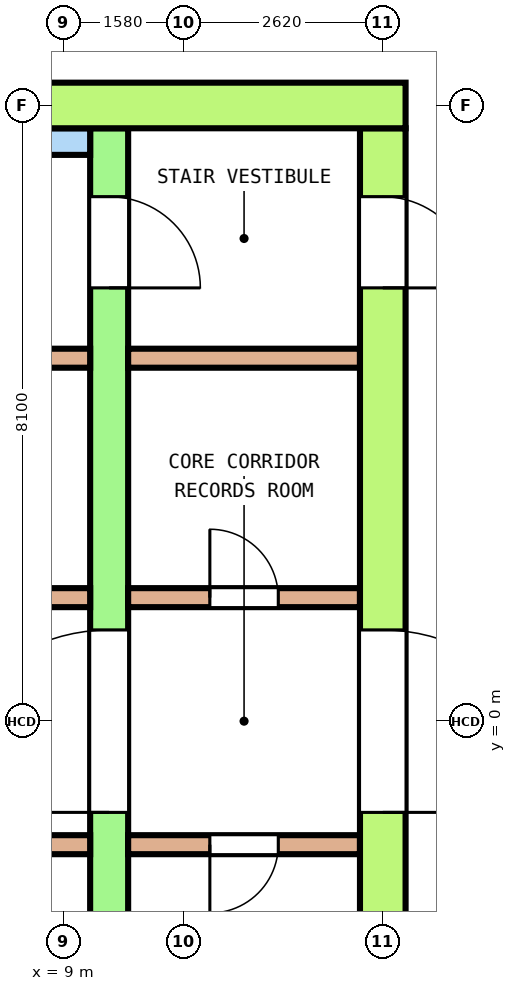
"""IFC4 building model, lengths in metres.
Left out: names, types, materials, properties, quantities, classifications, styles, units other than length and angle.
Written with IfcOpenShell. Run it as: python <this file> out.ifc"""

import sys

from ifc_helpers import new_model, si_unit, direction, frame, frame_2d, origin, place, context, subcontext, project, spatial, polyline, rectangle, outline, extrude, element, fill, save


model = new_model("IFC4")
c1 = context("Model", 3, precision=1e-05, world=origin(), true_north=direction((0.0, 1.0)))
c2 = subcontext(c1, "Body", "Model", "MODEL_VIEW")
j1 = project(units=[si_unit("LENGTHUNIT", "METRE"), si_unit("PLANEANGLEUNIT", "RADIAN")], contexts=[c1])
p1 = place(None, origin())
s1 = spatial("IfcSite", under=j1, at=p1, CompositionType="ELEMENT")
p2 = place(p1, origin())
s2 = spatial("IfcBuilding", under=s1, at=p2, CompositionType="ELEMENT")
p3 = place(p2, frame((0.0, 0.0, 241.4)))
s3 = spatial("IfcBuildingStorey", under=s2, at=p3, CompositionType="ELEMENT", Elevation=241.4)
p4 = place(p3, frame((13.587, -19.266, 0.0), z_axis=(0.0, 0.0, 1.0), x_axis=(0.500004117472, 0.866023026548, 0.0)))
e1 = element("IfcWall", 1, at=p4, inside=s3, PredefinedType="SOLIDWALL", context=c2, shape_type="SweptSolid", body=[
    extrude(outline(polyline([(-0.027, -0.1), (1.017, -0.1), (2.061, -0.1), (3.105, -0.1), (4.149, -0.1), (5.193, -0.1), (6.237, -0.1), (7.281, -0.1), (8.325, -0.1), (9.369, -0.1), (10.414, -0.1), (11.458, -0.1), (12.501, -0.1), (13.546, -0.1), (14.59, -0.1), (15.634, -0.1), (16.678, -0.1), (17.722, -0.1), (18.766, -0.1), (19.81, -0.1), (19.756, 0.1), (18.718, 0.1), (17.679, 0.1), (16.641, 0.1), (15.603, 0.1), (14.564, 0.1), (13.526, 0.1), (12.488, 0.1), (11.449, 0.1), (10.411, 0.1), (9.372, 0.1), (8.334, 0.1), (7.295, 0.1), (6.257, 0.1), (5.219, 0.1), (4.18, 0.1), (3.142, 0.1), (2.104, 0.1), (1.065, 0.1), (0.027, 0.1), (-0.027, -0.1)])), origin(), (0.0, 0.0, 1.0), 3.7),
])
p5 = place(p4, frame((0.528, 0.0, 0.1)))
e2 = element("IfcOpeningElement", 2, at=p5, cuts=e1, PredefinedType="OPENING", context=c2, shape_type="SweptSolid", body=[
    extrude(rectangle(XDim=2.9, YDim=2.65, at=frame_2d((1.45, 1.325))), frame((0.0, 0.11, 0.0), z_axis=(0.0, -1.0, 0.0), x_axis=(1.0, 0.0, 0.0)), (0.0, 0.0, 1.0), 0.22),
])
p6 = place(p4, frame((4.485, 0.0, 0.1)))
e3 = element("IfcOpeningElement", 3, at=p6, cuts=e1, PredefinedType="OPENING", context=c2, shape_type="SweptSolid", body=[
    extrude(rectangle(XDim=2.9, YDim=2.65, at=frame_2d((1.45, 1.325))), frame((0.0, 0.11, 0.0), z_axis=(0.0, -1.0, 0.0), x_axis=(1.0, 0.0, 0.0)), (0.0, 0.0, 1.0), 0.22),
])
p7 = place(p4, frame((8.991, 0.0, 0.0)))
e4 = element("IfcOpeningElement", 4, at=p7, cuts=e1, PredefinedType="OPENING", context=c2, shape_type="SweptSolid", body=[
    extrude(rectangle(XDim=1.8, YDim=2.4, at=frame_2d((0.9, 1.2))), frame((0.0, 0.11, 0.0), z_axis=(0.0, -1.0, 0.0), x_axis=(1.0, 0.0, 0.0)), (0.0, 0.0, 1.0), 0.22),
])
p8 = place(p4, frame((8.991, 0.0, 2.55)))
e5 = element("IfcOpeningElement", 5, at=p8, cuts=e1, PredefinedType="OPENING", context=c2, shape_type="SweptSolid", body=[
    extrude(rectangle(XDim=1.8, YDim=0.2, at=frame_2d((0.9, 0.1))), frame((0.0, 0.11, 0.0), z_axis=(0.0, -1.0, 0.0), x_axis=(1.0, 0.0, 0.0)), (0.0, 0.0, 1.0), 0.22),
])
p9 = place(p4, frame((12.398, 0.0, 0.1)))
e6 = element("IfcOpeningElement", 6, at=p9, cuts=e1, PredefinedType="OPENING", context=c2, shape_type="SweptSolid", body=[
    extrude(rectangle(XDim=2.9, YDim=2.65, at=frame_2d((1.45, 1.325))), frame((0.0, 0.11, 0.0), z_axis=(0.0, -1.0, 0.0), x_axis=(1.0, 0.0, 0.0)), (0.0, 0.0, 1.0), 0.22),
])
p10 = place(p4, frame((16.355, 0.0, 0.1)))
e7 = element("IfcOpeningElement", 7, at=p10, cuts=e1, PredefinedType="OPENING", context=c2, shape_type="SweptSolid", body=[
    extrude(rectangle(XDim=2.9, YDim=2.65, at=frame_2d((1.45, 1.325))), frame((0.0, 0.11, 0.0), z_axis=(0.0, -1.0, 0.0), x_axis=(1.0, 0.0, 0.0)), (0.0, 0.0, 1.0), 0.22),
])
p11 = place(p3, frame((-13.5, 8.1, 0.0), z_axis=(0.0, 0.0, 1.0), x_axis=(1.0, 0.0, 0.0)))
e8 = element("IfcWall", 8, at=p11, inside=s3, PredefinedType="SHEAR", context=c2, shape_type="SweptSolid", body=[
    extrude(rectangle(XDim=27.0, YDim=0.6, at=frame_2d((13.5, 0.0))), origin(), (0.0, 0.0, 1.0), 3.7),
])
p12 = place(p11, frame((14.425, 0.0, 0.0)))
e9 = element("IfcOpeningElement", 9, at=p12, cuts=e8, PredefinedType="OPENING", context=c2, shape_type="SweptSolid", body=[
    extrude(rectangle(XDim=1.4, YDim=2.1, at=frame_2d((0.7, 1.05))), frame((0.0, 0.31, 0.0), z_axis=(0.0, -1.0, 0.0), x_axis=(1.0, 0.0, 0.0)), (0.0, 0.0, 1.0), 0.62),
])
p13 = place(p3, frame((13.2, -7.8, 0.0), z_axis=(0.0, 0.0, 1.0), x_axis=(0.0, 1.0, 0.0)))
e10 = element("IfcWall", 10, at=p13, inside=s3, PredefinedType="SHEAR", context=c2, shape_type="SweptSolid", body=[
    extrude(rectangle(XDim=15.6, YDim=0.6, at=frame_2d((7.8, 0.0))), origin(), (0.0, 0.0, 1.0), 3.7),
])
p14 = place(p13, frame((6.6, 0.0, 0.0)))
e11 = element("IfcOpeningElement", 11, at=p14, cuts=e10, PredefinedType="OPENING", context=c2, shape_type="SweptSolid", body=[
    extrude(rectangle(XDim=2.4, YDim=2.1, at=frame_2d((1.2, 1.05))), frame((0.0, 0.31, 0.0), z_axis=(0.0, -1.0, 0.0), x_axis=(1.0, 0.0, 0.0)), (0.0, 0.0, 1.0), 0.62),
])
p15 = place(p13, frame((13.5, 0.0, 0.0)))
e12 = element("IfcOpeningElement", 12, at=p15, cuts=e10, PredefinedType="OPENING", context=c2, shape_type="SweptSolid", body=[
    extrude(rectangle(XDim=1.2, YDim=2.1, at=frame_2d((0.6, 1.05))), frame((0.0, 0.31, 0.0), z_axis=(0.0, -1.0, 0.0), x_axis=(1.0, 0.0, 0.0)), (0.0, 0.0, 1.0), 0.62),
])
p16 = place(p13, frame((1.0, 0.0, 0.0)))
e13 = element("IfcOpeningElement", 13, at=p16, cuts=e10, PredefinedType="OPENING", context=c2, shape_type="SweptSolid", body=[
    extrude(rectangle(XDim=1.0, YDim=2.1, at=frame_2d((0.5, 1.05))), frame((0.0, 0.31, 0.0), z_axis=(0.0, -1.0, 0.0), x_axis=(1.0, 0.0, 0.0)), (0.0, 0.0, 1.0), 0.62),
])
p17 = place(p3, frame((9.6, -7.8, 0.0), z_axis=(0.0, 0.0, 1.0), x_axis=(0.0, 1.0, 0.0)))
e14 = element("IfcWall", 14, at=p17, inside=s3, PredefinedType="SHEAR", context=c2, shape_type="SweptSolid", body=[
    extrude(rectangle(XDim=15.6, YDim=0.5, at=frame_2d((7.8, 0.0))), origin(), (0.0, 0.0, 1.0), 3.7),
])
p18 = place(p17, frame((6.6, 0.0, 0.0)))
e15 = element("IfcOpeningElement", 15, at=p18, cuts=e14, PredefinedType="OPENING", context=c2, shape_type="SweptSolid", body=[
    extrude(rectangle(XDim=2.4, YDim=2.1, at=frame_2d((1.2, 1.05))), frame((0.0, 0.26, 0.0), z_axis=(0.0, -1.0, 0.0), x_axis=(1.0, 0.0, 0.0)), (0.0, 0.0, 1.0), 0.52),
])
p19 = place(p17, frame((13.5, 0.0, 0.0)))
e16 = element("IfcOpeningElement", 16, at=p19, cuts=e14, PredefinedType="OPENING", context=c2, shape_type="SweptSolid", body=[
    extrude(rectangle(XDim=1.2, YDim=2.1, at=frame_2d((0.6, 1.05))), frame((0.0, 0.26, 0.0), z_axis=(0.0, -1.0, 0.0), x_axis=(1.0, 0.0, 0.0)), (0.0, 0.0, 1.0), 0.52),
])
p20 = place(p17, frame((1.0, 0.0, 0.0)))
e17 = element("IfcOpeningElement", 17, at=p20, cuts=e14, PredefinedType="OPENING", context=c2, shape_type="SweptSolid", body=[
    extrude(rectangle(XDim=1.0, YDim=2.1, at=frame_2d((0.5, 1.05))), frame((0.0, 0.26, 0.0), z_axis=(0.0, -1.0, 0.0), x_axis=(1.0, 0.0, 0.0)), (0.0, 0.0, 1.0), 0.52),
])
p21 = place(p3, frame((-9.35, 1.625, 0.0), z_axis=(0.0, 0.0, 1.0), x_axis=(1.0, 0.0, 0.0)))
e18 = element("IfcWall", 18, at=p21, inside=s3, PredefinedType="SOLIDWALL", context=c2, shape_type="SweptSolid", body=[
    extrude(rectangle(XDim=18.7, YDim=0.25, at=frame_2d((9.35, 0.0))), origin(), (0.0, 0.0, 1.0), 3.7),
])
p22 = place(p21, frame((7.65, 0.0, 0.0)))
e19 = element("IfcOpeningElement", 19, at=p22, cuts=e18, PredefinedType="OPENING", context=c2, shape_type="SweptSolid", body=[
    extrude(rectangle(XDim=1.1, YDim=2.1, at=frame_2d((0.55, 1.05))), frame((0.0, 0.135, 0.0), z_axis=(0.0, -1.0, 0.0), x_axis=(1.0, 0.0, 0.0)), (0.0, 0.0, 1.0), 0.27),
])
p23 = place(p21, frame((9.95, 0.0, 0.0)))
e20 = element("IfcOpeningElement", 20, at=p23, cuts=e18, PredefinedType="OPENING", context=c2, shape_type="SweptSolid", body=[
    extrude(rectangle(XDim=1.1, YDim=2.1, at=frame_2d((0.55, 1.05))), frame((0.0, 0.135, 0.0), z_axis=(0.0, -1.0, 0.0), x_axis=(1.0, 0.0, 0.0)), (0.0, 0.0, 1.0), 0.27),
])
p24 = place(p21, frame((12.4, 0.0, 0.0)))
e21 = element("IfcOpeningElement", 21, at=p24, cuts=e18, PredefinedType="OPENING", context=c2, shape_type="SweptSolid", body=[
    extrude(rectangle(XDim=1.1, YDim=2.1, at=frame_2d((0.55, 1.05))), frame((0.0, 0.135, 0.0), z_axis=(0.0, -1.0, 0.0), x_axis=(1.0, 0.0, 0.0)), (0.0, 0.0, 1.0), 0.27),
])
p25 = place(p21, frame((0.575, 0.0, 0.0)))
e22 = element("IfcOpeningElement", 22, at=p25, cuts=e18, PredefinedType="OPENING", context=c2, shape_type="SweptSolid", body=[
    extrude(rectangle(XDim=0.9, YDim=2.1, at=frame_2d((0.45, 1.05))), frame((0.0, 0.135, 0.0), z_axis=(0.0, -1.0, 0.0), x_axis=(1.0, 0.0, 0.0)), (0.0, 0.0, 1.0), 0.27),
])
p26 = place(p21, frame((2.919, 0.0, 0.0)))
e23 = element("IfcOpeningElement", 23, at=p26, cuts=e18, PredefinedType="OPENING", context=c2, shape_type="SweptSolid", body=[
    extrude(rectangle(XDim=0.9, YDim=2.1, at=frame_2d((0.45, 1.05))), frame((0.0, 0.135, 0.0), z_axis=(0.0, -1.0, 0.0), x_axis=(1.0, 0.0, 0.0)), (0.0, 0.0, 1.0), 0.27),
])
p27 = place(p21, frame((5.281, 0.0, 0.0)))
e24 = element("IfcOpeningElement", 24, at=p27, cuts=e18, PredefinedType="OPENING", context=c2, shape_type="SweptSolid", body=[
    extrude(rectangle(XDim=0.9, YDim=2.1, at=frame_2d((0.45, 1.05))), frame((0.0, 0.135, 0.0), z_axis=(0.0, -1.0, 0.0), x_axis=(1.0, 0.0, 0.0)), (0.0, 0.0, 1.0), 0.27),
])
p28 = place(p21, frame((14.9, 0.0, 0.0)))
e25 = element("IfcOpeningElement", 25, at=p28, cuts=e18, PredefinedType="OPENING", context=c2, shape_type="SweptSolid", body=[
    extrude(rectangle(XDim=0.9, YDim=2.1, at=frame_2d((0.45, 1.05))), frame((0.0, 0.135, 0.0), z_axis=(0.0, -1.0, 0.0), x_axis=(1.0, 0.0, 0.0)), (0.0, 0.0, 1.0), 0.27),
])
p29 = place(p21, frame((17.225, 0.0, 0.0)))
e26 = element("IfcOpeningElement", 26, at=p29, cuts=e18, PredefinedType="OPENING", context=c2, shape_type="SweptSolid", body=[
    extrude(rectangle(XDim=0.9, YDim=2.1, at=frame_2d((0.45, 1.05))), frame((0.0, 0.135, 0.0), z_axis=(0.0, -1.0, 0.0), x_axis=(1.0, 0.0, 0.0)), (0.0, 0.0, 1.0), 0.27),
])
p30 = place(p3, frame((9.85, 1.625, 0.0), z_axis=(0.0, 0.0, 1.0), x_axis=(1.0, 0.0, 0.0)))
e27 = element("IfcWall", 27, at=p30, inside=s3, PredefinedType="SOLIDWALL", context=c2, shape_type="SweptSolid", body=[
    extrude(rectangle(XDim=3.05, YDim=0.25, at=frame_2d((1.525, 0.0))), origin(), (0.0, 0.0, 1.0), 3.7),
])
p31 = place(p30, frame((1.075, 0.0, 0.0)))
e28 = element("IfcOpeningElement", 28, at=p31, cuts=e27, PredefinedType="OPENING", context=c2, shape_type="SweptSolid", body=[
    extrude(rectangle(XDim=0.9, YDim=2.1, at=frame_2d((0.45, 1.05))), frame((0.0, 0.135, 0.0), z_axis=(0.0, -1.0, 0.0), x_axis=(1.0, 0.0, 0.0)), (0.0, 0.0, 1.0), 0.27),
])
p32 = place(p3, frame((-9.35, 4.775, 0.0), z_axis=(0.0, 0.0, 1.0), x_axis=(1.0, 0.0, 0.0)))
e29 = element("IfcWall", 29, at=p32, inside=s3, PredefinedType="SOLIDWALL", context=c2, shape_type="SweptSolid", body=[
    extrude(rectangle(XDim=18.7, YDim=0.25, at=frame_2d((9.35, 0.0))), origin(), (0.0, 0.0, 1.0), 3.7),
])
p33 = place(p3, frame((9.85, 4.775, 0.0), z_axis=(0.0, 0.0, 1.0), x_axis=(1.0, 0.0, 0.0)))
e30 = element("IfcWall", 30, at=p33, inside=s3, PredefinedType="SOLIDWALL", context=c2, shape_type="SweptSolid", body=[
    extrude(rectangle(XDim=3.05, YDim=0.25, at=frame_2d((1.525, 0.0))), origin(), (0.0, 0.0, 1.0), 3.7),
])
p34 = place(p3, frame((-9.35, -1.625, 0.0), z_axis=(0.0, 0.0, 1.0), x_axis=(1.0, 0.0, 0.0)))
e31 = element("IfcWall", 31, at=p34, inside=s3, PredefinedType="SOLIDWALL", context=c2, shape_type="SweptSolid", body=[
    extrude(rectangle(XDim=18.7, YDim=0.25, at=frame_2d((9.35, 0.0))), origin(), (0.0, 0.0, 1.0), 3.7),
])
p35 = place(p34, frame((7.65, 0.0, 0.0)))
e32 = element("IfcOpeningElement", 32, at=p35, cuts=e31, PredefinedType="OPENING", context=c2, shape_type="SweptSolid", body=[
    extrude(rectangle(XDim=1.1, YDim=2.1, at=frame_2d((0.55, 1.05))), frame((0.0, 0.135, 0.0), z_axis=(0.0, -1.0, 0.0), x_axis=(1.0, 0.0, 0.0)), (0.0, 0.0, 1.0), 0.27),
])
p36 = place(p34, frame((9.95, 0.0, 0.0)))
e33 = element("IfcOpeningElement", 33, at=p36, cuts=e31, PredefinedType="OPENING", context=c2, shape_type="SweptSolid", body=[
    extrude(rectangle(XDim=1.1, YDim=2.1, at=frame_2d((0.55, 1.05))), frame((0.0, 0.135, 0.0), z_axis=(0.0, -1.0, 0.0), x_axis=(1.0, 0.0, 0.0)), (0.0, 0.0, 1.0), 0.27),
])
p37 = place(p34, frame((12.4, 0.0, 0.0)))
e34 = element("IfcOpeningElement", 34, at=p37, cuts=e31, PredefinedType="OPENING", context=c2, shape_type="SweptSolid", body=[
    extrude(rectangle(XDim=1.1, YDim=2.1, at=frame_2d((0.55, 1.05))), frame((0.0, 0.135, 0.0), z_axis=(0.0, -1.0, 0.0), x_axis=(1.0, 0.0, 0.0)), (0.0, 0.0, 1.0), 0.27),
])
p38 = place(p34, frame((0.575, 0.0, 0.0)))
e35 = element("IfcOpeningElement", 35, at=p38, cuts=e31, PredefinedType="OPENING", context=c2, shape_type="SweptSolid", body=[
    extrude(rectangle(XDim=0.9, YDim=2.1, at=frame_2d((0.45, 1.05))), frame((0.0, 0.135, 0.0), z_axis=(0.0, -1.0, 0.0), x_axis=(1.0, 0.0, 0.0)), (0.0, 0.0, 1.0), 0.27),
])
p39 = place(p34, frame((2.519, 0.0, 0.0)))
e36 = element("IfcOpeningElement", 36, at=p39, cuts=e31, PredefinedType="OPENING", context=c2, shape_type="SweptSolid", body=[
    extrude(rectangle(XDim=0.9, YDim=2.1, at=frame_2d((0.45, 1.05))), frame((0.0, 0.135, 0.0), z_axis=(0.0, -1.0, 0.0), x_axis=(1.0, 0.0, 0.0)), (0.0, 0.0, 1.0), 0.27),
])
p40 = place(p34, frame((4.881, 0.0, 0.0)))
e37 = element("IfcOpeningElement", 37, at=p40, cuts=e31, PredefinedType="OPENING", context=c2, shape_type="SweptSolid", body=[
    extrude(rectangle(XDim=0.9, YDim=2.1, at=frame_2d((0.45, 1.05))), frame((0.0, 0.135, 0.0), z_axis=(0.0, -1.0, 0.0), x_axis=(1.0, 0.0, 0.0)), (0.0, 0.0, 1.0), 0.27),
])
p41 = place(p34, frame((14.9, 0.0, 0.0)))
e38 = element("IfcOpeningElement", 38, at=p41, cuts=e31, PredefinedType="OPENING", context=c2, shape_type="SweptSolid", body=[
    extrude(rectangle(XDim=0.9, YDim=2.1, at=frame_2d((0.45, 1.05))), frame((0.0, 0.135, 0.0), z_axis=(0.0, -1.0, 0.0), x_axis=(1.0, 0.0, 0.0)), (0.0, 0.0, 1.0), 0.27),
])
p42 = place(p34, frame((17.225, 0.0, 0.0)))
e39 = element("IfcOpeningElement", 39, at=p42, cuts=e31, PredefinedType="OPENING", context=c2, shape_type="SweptSolid", body=[
    extrude(rectangle(XDim=0.9, YDim=2.1, at=frame_2d((0.45, 1.05))), frame((0.0, 0.135, 0.0), z_axis=(0.0, -1.0, 0.0), x_axis=(1.0, 0.0, 0.0)), (0.0, 0.0, 1.0), 0.27),
])
p43 = place(p3, frame((9.85, -1.625, 0.0), z_axis=(0.0, 0.0, 1.0), x_axis=(1.0, 0.0, 0.0)))
e40 = element("IfcWall", 40, at=p43, inside=s3, PredefinedType="SOLIDWALL", context=c2, shape_type="SweptSolid", body=[
    extrude(rectangle(XDim=3.05, YDim=0.25, at=frame_2d((1.525, 0.0))), origin(), (0.0, 0.0, 1.0), 3.7),
])
p44 = place(p43, frame((1.075, 0.0, 0.0)))
e41 = element("IfcOpeningElement", 41, at=p44, cuts=e40, PredefinedType="OPENING", context=c2, shape_type="SweptSolid", body=[
    extrude(rectangle(XDim=0.9, YDim=2.1, at=frame_2d((0.45, 1.05))), frame((0.0, 0.135, 0.0), z_axis=(0.0, -1.0, 0.0), x_axis=(1.0, 0.0, 0.0)), (0.0, 0.0, 1.0), 0.27),
])
p45 = place(p3, frame((3.55, 7.625, 0.0), z_axis=(0.0, 0.0, 1.0), x_axis=(1.0, 0.0, 0.0)))
e42 = element("IfcWall", 42, at=p45, inside=s3, PredefinedType="SOLIDWALL", context=c2, shape_type="SweptSolid", body=[
    extrude(rectangle(XDim=5.8, YDim=0.35, at=frame_2d((2.9, 0.0))), origin(), (0.0, 0.0, 1.0), 3.7),
])
p46 = place(p18, origin())
e43 = element("IfcDoor", 43, at=p46, inside=s3, OperationType="DOUBLE_DOOR_SINGLE_SWING", PredefinedType="DOOR", context=c2, shape_type="SweptSolid", body=[
    extrude(rectangle(XDim=2.4, YDim=2.1, at=frame_2d((1.2, 1.05))), frame((0.0, 0.2, 0.0), z_axis=(0.0, -1.0, 0.0), x_axis=(1.0, 0.0, 0.0)), (0.0, 0.0, 1.0), 0.4),
])
fill(e15, e43)
p47 = place(p14, origin())
e44 = element("IfcDoor", 44, at=p47, inside=s3, OperationType="DOUBLE_DOOR_SINGLE_SWING", PredefinedType="DOOR", context=c2, shape_type="SweptSolid", body=[
    extrude(rectangle(XDim=2.4, YDim=2.1, at=frame_2d((1.2, 1.05))), frame((0.0, 0.25, 0.0), z_axis=(0.0, -1.0, 0.0), x_axis=(1.0, 0.0, 0.0)), (0.0, 0.0, 1.0), 0.5),
])
fill(e11, e44)
p48 = place(p19, origin())
e45 = element("IfcDoor", 45, at=p48, inside=s3, OperationType="SINGLE_SWING_RIGHT", PredefinedType="DOOR", context=c2, shape_type="SweptSolid", body=[
    extrude(rectangle(XDim=1.2, YDim=2.1, at=frame_2d((0.6, 1.05))), frame((0.0, 0.2, 0.0), z_axis=(0.0, -1.0, 0.0), x_axis=(1.0, 0.0, 0.0)), (0.0, 0.0, 1.0), 0.4),
])
fill(e16, e45)
p49 = place(p15, origin())
e46 = element("IfcDoor", 46, at=p49, inside=s3, OperationType="SINGLE_SWING_LEFT", PredefinedType="DOOR", context=c2, shape_type="SweptSolid", body=[
    extrude(rectangle(XDim=1.2, YDim=2.1, at=frame_2d((0.6, 1.05))), frame((0.0, 0.25, 0.0), z_axis=(0.0, -1.0, 0.0), x_axis=(1.0, 0.0, 0.0)), (0.0, 0.0, 1.0), 0.5),
])
fill(e12, e46)
p50 = place(p31, origin())
e47 = element("IfcDoor", 47, at=p50, inside=s3, OperationType="SINGLE_SWING_RIGHT", PredefinedType="DOOR", context=c2, shape_type="SweptSolid", body=[
    extrude(rectangle(XDim=0.9, YDim=2.1, at=frame_2d((0.45, 1.05))), frame((0.0, 0.075, 0.0), z_axis=(0.0, -1.0, 0.0), x_axis=(1.0, 0.0, 0.0)), (0.0, 0.0, 1.0), 0.15),
])
fill(e28, e47)
p51 = place(p44, origin())
e48 = element("IfcDoor", 48, at=p51, inside=s3, OperationType="SINGLE_SWING_LEFT", PredefinedType="DOOR", context=c2, shape_type="SweptSolid", body=[
    extrude(rectangle(XDim=0.9, YDim=2.1, at=frame_2d((0.45, 1.05))), frame((0.0, 0.075, 0.0), z_axis=(0.0, -1.0, 0.0), x_axis=(1.0, 0.0, 0.0)), (0.0, 0.0, 1.0), 0.15),
])
fill(e41, e48)
save(model, sys.argv[1])
